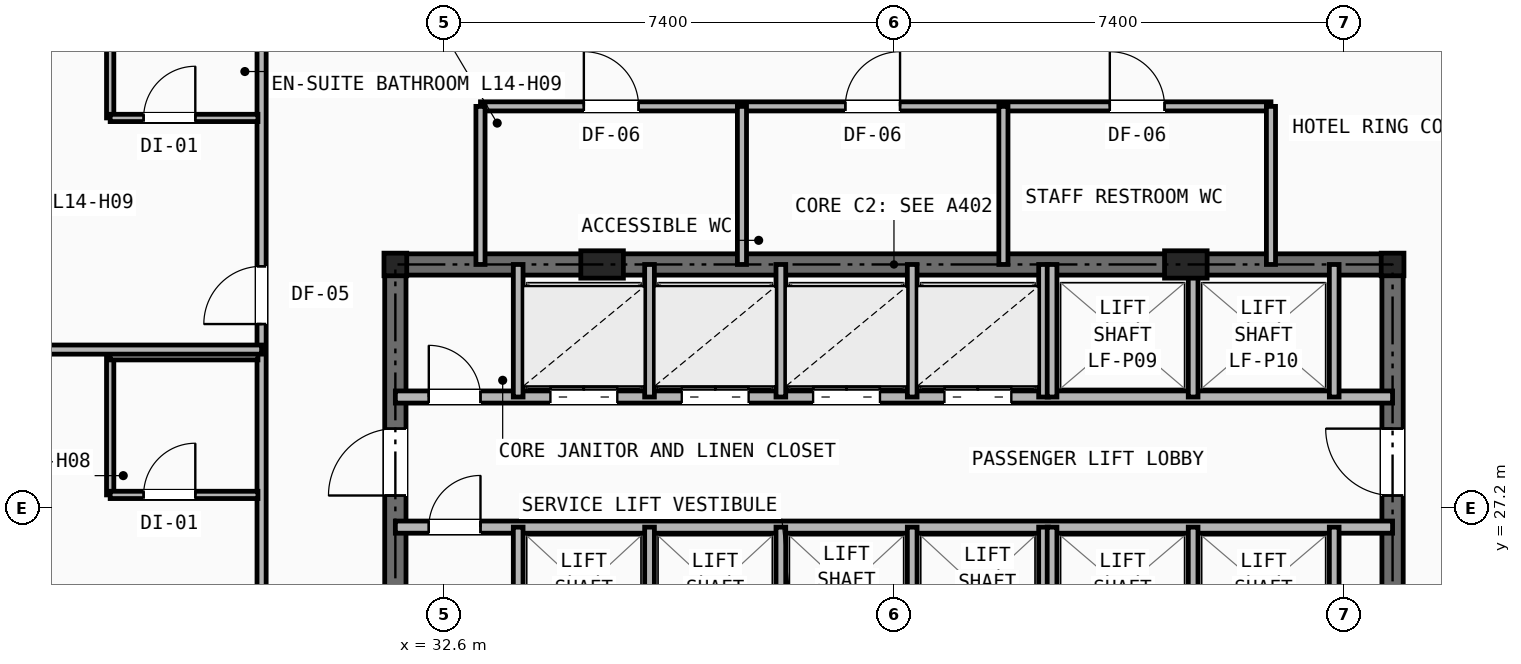
"""IFC4 building model, lengths in metres.
Left out: names, types, materials, properties, quantities, classifications, styles, units other than length and angle.
Written with IfcOpenShell. Run it as: python <this file> out.ifc"""

import sys

from ifc_helpers import new_model, si_unit, direction, frame, frame_2d, origin, origin_2d, place, context, subcontext, project, spatial, rectangle, i_section, extrude, element, fill, save


model = new_model("IFC4")
c1 = context("Model", 3, precision=1e-05, world=origin(), true_north=direction((0.0, 1.0)))
c2 = subcontext(c1, "Body", "Model", "MODEL_VIEW")
j1 = project(units=[si_unit("LENGTHUNIT", "METRE"), si_unit("PLANEANGLEUNIT", "RADIAN")], contexts=[c1])
p1 = place(None, origin())
s1 = spatial("IfcSite", under=j1, at=p1, CompositionType="ELEMENT")
p2 = place(p1, origin())
s2 = spatial("IfcBuilding", under=s1, at=p2, CompositionType="ELEMENT")
p3 = place(p2, frame((0.0, 0.0, 52.8)))
s3 = spatial("IfcBuildingStorey", under=s2, at=p3, CompositionType="ELEMENT", Elevation=52.8)
for number, where, z_axis, x_axis in (
    (1, (31.8, 31.2, 0.0), (0.0, 0.0, 1.0), (1.0, 0.0, 0.0)),
    (2, (48.2, 31.2, 0.0), (0.0, 0.0, 1.0), (1.0, 0.0, 0.0)),
):
    element("IfcColumn", number, at=place(p3, frame(where, z_axis=z_axis, x_axis=x_axis)), inside=s3, PredefinedType="COLUMN", context=c2, shape_type="SweptSolid", body=[
        extrude(i_section(OverallWidth=0.374, OverallDepth=0.372, WebThickness=0.016, FlangeThickness=0.026, at=origin_2d()), origin(), (0.0, 0.0, 1.0), 3.2),
    ])
for number, where, z_axis, x_axis in (
    (3, (35.2, 31.2, 0.0), (0.0, 0.0, 1.0), (1.0, 0.0, 0.0)),
    (4, (44.8, 31.2, 0.0), (0.0, 0.0, 1.0), (1.0, 0.0, 0.0)),
):
    element("IfcColumn", number, at=place(p3, frame(where, z_axis=z_axis, x_axis=x_axis)), inside=s3, PredefinedType="PILASTER", context=c2, shape_type="SweptSolid", body=[
        extrude(rectangle(XDim=0.7, YDim=0.45, at=origin_2d()), origin(), (0.0, 0.0, 1.0), 3.2),
    ])
p4 = place(p3, frame((31.8, 31.2, 0.0), z_axis=(0.0, 0.0, 1.0), x_axis=(1.0, 0.0, 0.0)))
e5 = element("IfcWall", 5, at=p4, inside=s3, PredefinedType="SHEAR", context=c2, shape_type="SweptSolid", body=[
    extrude(rectangle(XDim=16.4, YDim=0.35, at=frame_2d((8.2, 0.0))), origin(), (0.0, 0.0, 1.0), 2.98),
])
p5 = place(p3, frame((31.8, 16.4, 0.0), z_axis=(0.0, 0.0, 1.0), x_axis=(0.0, 1.0, 0.0)))
e6 = element("IfcWall", 6, at=p5, inside=s3, PredefinedType="SHEAR", context=c2, shape_type="SweptSolid", body=[
    extrude(rectangle(XDim=14.8, YDim=0.35, at=frame_2d((7.4, 0.0))), origin(), (0.0, 0.0, 1.0), 2.98),
])
p6 = place(p5, frame((11.0, 0.0, 0.0)))
e7 = element("IfcOpeningElement", 7, at=p6, cuts=e6, PredefinedType="OPENING", context=c2, shape_type="SweptSolid", body=[
    extrude(rectangle(XDim=1.1, YDim=2.15, at=frame_2d((0.55, 1.075))), frame((0.0, 0.185, 0.0), z_axis=(0.0, -1.0, 0.0), x_axis=(1.0, 0.0, 0.0)), (0.0, 0.0, 1.0), 0.37),
])
p7 = place(p3, frame((48.2, 16.4, 0.0), z_axis=(0.0, 0.0, 1.0), x_axis=(0.0, 1.0, 0.0)))
e8 = element("IfcWall", 8, at=p7, inside=s3, PredefinedType="SHEAR", context=c2, shape_type="SweptSolid", body=[
    extrude(rectangle(XDim=14.8, YDim=0.35, at=frame_2d((7.4, 0.0))), origin(), (0.0, 0.0, 1.0), 2.98),
])
p8 = place(p7, frame((11.0, 0.0, 0.0)))
e9 = element("IfcOpeningElement", 9, at=p8, cuts=e8, PredefinedType="OPENING", context=c2, shape_type="SweptSolid", body=[
    extrude(rectangle(XDim=1.1, YDim=2.15, at=frame_2d((0.55, 1.075))), frame((0.0, 0.185, 0.0), z_axis=(0.0, -1.0, 0.0), x_axis=(1.0, 0.0, 0.0)), (0.0, 0.0, 1.0), 0.37),
])
p9 = place(p3, frame((31.8, 29.02, 0.0), z_axis=(0.0, 0.0, 1.0), x_axis=(1.0, 0.0, 0.0)))
e10 = element("IfcWall", 10, at=p9, inside=s3, PredefinedType="SOLIDWALL", context=c2, shape_type="SweptSolid", body=[
    extrude(rectangle(XDim=16.4, YDim=0.2, at=frame_2d((8.2, 0.0))), origin(), (0.0, 0.0, 1.0), 2.431),
])
p10 = place(p9, frame((0.55, 0.0, 0.0)))
e11 = element("IfcOpeningElement", 11, at=p10, cuts=e10, PredefinedType="OPENING", context=c2, shape_type="SweptSolid", body=[
    extrude(rectangle(XDim=0.85, YDim=2.05, at=frame_2d((0.425, 1.025))), frame((0.0, 0.11, 0.0), z_axis=(0.0, -1.0, 0.0), x_axis=(1.0, 0.0, 0.0)), (0.0, 0.0, 1.0), 0.22),
])
p11 = place(p9, frame((2.55, 0.0, 0.0)))
e12 = element("IfcOpeningElement", 12, at=p11, cuts=e10, PredefinedType="OPENING", context=c2, shape_type="SweptSolid", body=[
    extrude(rectangle(XDim=1.1, YDim=2.15, at=frame_2d((0.55, 1.075))), frame((0.0, 0.11, 0.0), z_axis=(0.0, -1.0, 0.0), x_axis=(1.0, 0.0, 0.0)), (0.0, 0.0, 1.0), 0.22),
])
p12 = place(p9, frame((4.71, 0.0, 0.0)))
e13 = element("IfcOpeningElement", 13, at=p12, cuts=e10, PredefinedType="OPENING", context=c2, shape_type="SweptSolid", body=[
    extrude(rectangle(XDim=1.1, YDim=2.15, at=frame_2d((0.55, 1.075))), frame((0.0, 0.11, 0.0), z_axis=(0.0, -1.0, 0.0), x_axis=(1.0, 0.0, 0.0)), (0.0, 0.0, 1.0), 0.22),
])
p13 = place(p9, frame((6.87, 0.0, 0.0)))
e14 = element("IfcOpeningElement", 14, at=p13, cuts=e10, PredefinedType="OPENING", context=c2, shape_type="SweptSolid", body=[
    extrude(rectangle(XDim=1.1, YDim=2.15, at=frame_2d((0.55, 1.075))), frame((0.0, 0.11, 0.0), z_axis=(0.0, -1.0, 0.0), x_axis=(1.0, 0.0, 0.0)), (0.0, 0.0, 1.0), 0.22),
])
p14 = place(p9, frame((9.03, 0.0, 0.0)))
e15 = element("IfcOpeningElement", 15, at=p14, cuts=e10, PredefinedType="OPENING", context=c2, shape_type="SweptSolid", body=[
    extrude(rectangle(XDim=1.1, YDim=2.15, at=frame_2d((0.55, 1.075))), frame((0.0, 0.11, 0.0), z_axis=(0.0, -1.0, 0.0), x_axis=(1.0, 0.0, 0.0)), (0.0, 0.0, 1.0), 0.22),
])
p15 = place(p3, frame((31.8, 26.88, 0.0), z_axis=(0.0, 0.0, 1.0), x_axis=(1.0, 0.0, 0.0)))
e16 = element("IfcWall", 16, at=p15, inside=s3, PredefinedType="SOLIDWALL", context=c2, shape_type="SweptSolid", body=[
    extrude(rectangle(XDim=16.4, YDim=0.2, at=frame_2d((8.2, 0.0))), origin(), (0.0, 0.0, 1.0), 2.431),
])
p16 = place(p15, frame((0.55, 0.0, 0.0)))
e17 = element("IfcOpeningElement", 17, at=p16, cuts=e16, PredefinedType="OPENING", context=c2, shape_type="SweptSolid", body=[
    extrude(rectangle(XDim=0.85, YDim=2.05, at=frame_2d((0.425, 1.025))), frame((0.0, 0.11, 0.0), z_axis=(0.0, -1.0, 0.0), x_axis=(1.0, 0.0, 0.0)), (0.0, 0.0, 1.0), 0.22),
])
p17 = place(p3, frame((33.82, 29.02, 0.0), z_axis=(0.0, 0.0, 1.0), x_axis=(0.0, 1.0, 0.0)))
e18 = element("IfcWall", 18, at=p17, inside=s3, PredefinedType="SOLIDWALL", context=c2, shape_type="SweptSolid", body=[
    extrude(rectangle(XDim=2.18, YDim=0.16, at=frame_2d((1.09, 0.0))), origin(), (0.0, 0.0, 1.0), 2.431),
])
p18 = place(p3, frame((33.82, 24.8, 0.0), z_axis=(0.0, 0.0, 1.0), x_axis=(0.0, 1.0, 0.0)))
e19 = element("IfcWall", 19, at=p18, inside=s3, PredefinedType="SOLIDWALL", context=c2, shape_type="SweptSolid", body=[
    extrude(rectangle(XDim=2.08, YDim=0.16, at=frame_2d((1.04, 0.0))), origin(), (0.0, 0.0, 1.0), 2.98),
])
for number, where, z_axis, x_axis in (
    (20, (35.98, 29.02, 0.0), (0.0, 0.0, 1.0), (0.0, 1.0, 0.0)),
    (21, (38.14, 29.02, 0.0), (0.0, 0.0, 1.0), (0.0, 1.0, 0.0)),
    (22, (40.3, 29.02, 0.0), (0.0, 0.0, 1.0), (0.0, 1.0, 0.0)),
    (23, (42.46, 29.02, 0.0), (0.0, 0.0, 1.0), (0.0, 1.0, 0.0)),
):
    element("IfcWall", number, at=place(p3, frame(where, z_axis=z_axis, x_axis=x_axis)), inside=s3, PredefinedType="SOLIDWALL", context=c2, shape_type="SweptSolid", body=[
        extrude(rectangle(XDim=2.18, YDim=0.16, at=frame_2d((1.09, 0.0))), origin(), (0.0, 0.0, 1.0), 2.431),
    ])
for number, where, z_axis, x_axis in (
    (24, (35.98, 24.8, 0.0), (0.0, 0.0, 1.0), (0.0, 1.0, 0.0)),
    (25, (38.14, 24.8, 0.0), (0.0, 0.0, 1.0), (0.0, 1.0, 0.0)),
    (26, (40.3, 24.8, 0.0), (0.0, 0.0, 1.0), (0.0, 1.0, 0.0)),
    (27, (42.46, 24.8, 0.0), (0.0, 0.0, 1.0), (0.0, 1.0, 0.0)),
):
    element("IfcWall", number, at=place(p3, frame(where, z_axis=z_axis, x_axis=x_axis)), inside=s3, PredefinedType="SOLIDWALL", context=c2, shape_type="SweptSolid", body=[
        extrude(rectangle(XDim=2.08, YDim=0.16, at=frame_2d((1.04, 0.0))), origin(), (0.0, 0.0, 1.0), 2.98),
    ])
for number, where, z_axis, x_axis in (
    (28, (42.6, 29.02, 0.0), (0.0, 0.0, 1.0), (0.0, 1.0, 0.0)),
    (29, (44.92, 29.02, 0.0), (0.0, 0.0, 1.0), (0.0, 1.0, 0.0)),
    (30, (47.24, 29.02, 0.0), (0.0, 0.0, 1.0), (0.0, 1.0, 0.0)),
):
    element("IfcWall", number, at=place(p3, frame(where, z_axis=z_axis, x_axis=x_axis)), inside=s3, PredefinedType="SOLIDWALL", context=c2, shape_type="SweptSolid", body=[
        extrude(rectangle(XDim=2.18, YDim=0.16, at=frame_2d((1.09, 0.0))), origin(), (0.0, 0.0, 1.0), 2.431),
    ])
for number, where, z_axis, x_axis in (
    (31, (42.6, 24.8, 0.0), (0.0, 0.0, 1.0), (0.0, 1.0, 0.0)),
    (32, (44.92, 24.8, 0.0), (0.0, 0.0, 1.0), (0.0, 1.0, 0.0)),
    (33, (47.24, 24.8, 0.0), (0.0, 0.0, 1.0), (0.0, 1.0, 0.0)),
):
    element("IfcWall", number, at=place(p3, frame(where, z_axis=z_axis, x_axis=x_axis)), inside=s3, PredefinedType="SOLIDWALL", context=c2, shape_type="SweptSolid", body=[
        extrude(rectangle(XDim=2.08, YDim=0.16, at=frame_2d((1.04, 0.0))), origin(), (0.0, 0.0, 1.0), 2.98),
    ])
p19 = place(p3, frame((33.2, 33.8, 0.0), z_axis=(0.0, 0.0, 1.0), x_axis=(1.0, 0.0, 0.0)))
e34 = element("IfcWall", 34, at=p19, inside=s3, PredefinedType="PARTITIONING", context=c2, shape_type="SweptSolid", body=[
    extrude(rectangle(XDim=13.0, YDim=0.15, at=frame_2d((6.5, 0.0))), origin(), (0.0, 0.0, 1.0), 2.98),
])
p20 = place(p19, frame((1.7, 0.0, 0.0)))
e35 = element("IfcOpeningElement", 35, at=p20, cuts=e34, PredefinedType="OPENING", context=c2, shape_type="SweptSolid", body=[
    extrude(rectangle(XDim=0.9, YDim=2.1, at=frame_2d((0.45, 1.05))), frame((0.0, 0.085, 0.0), z_axis=(0.0, -1.0, 0.0), x_axis=(1.0, 0.0, 0.0)), (0.0, 0.0, 1.0), 0.17),
])
p21 = place(p19, frame((6.0, 0.0, 0.0)))
e36 = element("IfcOpeningElement", 36, at=p21, cuts=e34, PredefinedType="OPENING", context=c2, shape_type="SweptSolid", body=[
    extrude(rectangle(XDim=0.9, YDim=2.1, at=frame_2d((0.45, 1.05))), frame((0.0, 0.085, 0.0), z_axis=(0.0, -1.0, 0.0), x_axis=(1.0, 0.0, 0.0)), (0.0, 0.0, 1.0), 0.17),
])
p22 = place(p19, frame((10.35, 0.0, 0.0)))
e37 = element("IfcOpeningElement", 37, at=p22, cuts=e34, PredefinedType="OPENING", context=c2, shape_type="SweptSolid", body=[
    extrude(rectangle(XDim=0.9, YDim=2.1, at=frame_2d((0.45, 1.05))), frame((0.0, 0.085, 0.0), z_axis=(0.0, -1.0, 0.0), x_axis=(1.0, 0.0, 0.0)), (0.0, 0.0, 1.0), 0.17),
])
for number, where, z_axis, x_axis in (
    (38, (33.2, 31.2, 0.0), (0.0, 0.0, 1.0), (0.0, 1.0, 0.0)),
    (39, (46.2, 31.2, 0.0), (0.0, 0.0, 1.0), (0.0, 1.0, 0.0)),
    (40, (37.5, 31.2, 0.0), (0.0, 0.0, 1.0), (0.0, 1.0, 0.0)),
    (41, (41.8, 31.2, 0.0), (0.0, 0.0, 1.0), (0.0, 1.0, 0.0)),
):
    element("IfcWall", number, at=place(p3, frame(where, z_axis=z_axis, x_axis=x_axis)), inside=s3, PredefinedType="PARTITIONING", context=c2, shape_type="SweptSolid", body=[
        extrude(rectangle(XDim=2.6, YDim=0.15, at=frame_2d((1.3, 0.0))), origin(), (0.0, 0.0, 1.0), 2.431),
    ])
p23 = place(p3, frame((29.6, 14.1, 0.0), z_axis=(0.0, 0.0, 1.0), x_axis=(0.0, 1.0, 0.0)))
e42 = element("IfcWall", 42, at=p23, inside=s3, PredefinedType="PARTITIONING", context=c2, shape_type="SweptSolid", body=[
    extrude(rectangle(XDim=21.9, YDim=0.15, at=frame_2d((10.95, 0.0))), origin(), (0.0, 0.0, 1.0), 2.191),
])
p24 = place(p23, frame((0.42, 0.0, 0.0)))
e43 = element("IfcOpeningElement", 43, at=p24, cuts=e42, PredefinedType="OPENING", context=c2, shape_type="SweptSolid", body=[
    extrude(rectangle(XDim=0.95, YDim=2.1, at=frame_2d((0.475, 1.05))), frame((0.0, 0.085, 0.0), z_axis=(0.0, -1.0, 0.0), x_axis=(1.0, 0.0, 0.0)), (0.0, 0.0, 1.0), 0.17),
])
p25 = place(p23, frame((5.12, 0.0, 0.0)))
e44 = element("IfcOpeningElement", 44, at=p25, cuts=e42, PredefinedType="OPENING", context=c2, shape_type="SweptSolid", body=[
    extrude(rectangle(XDim=0.95, YDim=2.1, at=frame_2d((0.475, 1.05))), frame((0.0, 0.085, 0.0), z_axis=(0.0, -1.0, 0.0), x_axis=(1.0, 0.0, 0.0)), (0.0, 0.0, 1.0), 0.17),
])
p26 = place(p23, frame((10.12, 0.0, 0.0)))
e45 = element("IfcOpeningElement", 45, at=p26, cuts=e42, PredefinedType="OPENING", context=c2, shape_type="SweptSolid", body=[
    extrude(rectangle(XDim=0.95, YDim=2.1, at=frame_2d((0.475, 1.05))), frame((0.0, 0.085, 0.0), z_axis=(0.0, -1.0, 0.0), x_axis=(1.0, 0.0, 0.0)), (0.0, 0.0, 1.0), 0.17),
])
p27 = place(p23, frame((16.12, 0.0, 0.0)))
e46 = element("IfcOpeningElement", 46, at=p27, cuts=e42, PredefinedType="OPENING", context=c2, shape_type="SweptSolid", body=[
    extrude(rectangle(XDim=0.95, YDim=2.1, at=frame_2d((0.475, 1.05))), frame((0.0, 0.085, 0.0), z_axis=(0.0, -1.0, 0.0), x_axis=(1.0, 0.0, 0.0)), (0.0, 0.0, 1.0), 0.17),
])
p28 = place(p3, frame((27.11, 27.41, 0.0), z_axis=(0.0, 0.0, 1.0), x_axis=(0.0, 1.0, 0.0)))
e47 = element("IfcWall", 47, at=p28, inside=s3, PredefinedType="PARTITIONING", context=c2, shape_type="SweptSolid", body=[
    extrude(rectangle(XDim=2.28, YDim=0.12, at=frame_2d((1.14, 0.0))), origin(), (0.0, 0.0, 1.0), 2.98),
])
p29 = place(p3, frame((27.11, 27.41, 0.0), z_axis=(0.0, 0.0, 1.0), x_axis=(1.0, 0.0, 0.0)))
e48 = element("IfcWall", 48, at=p29, inside=s3, PredefinedType="PARTITIONING", context=c2, shape_type="SweptSolid", body=[
    extrude(rectangle(XDim=2.43, YDim=0.12, at=frame_2d((1.215, 0.0))), origin(), (0.0, 0.0, 1.0), 2.98),
])
p30 = place(p29, frame((0.55, 0.0, 0.0)))
e49 = element("IfcOpeningElement", 49, at=p30, cuts=e48, PredefinedType="OPENING", context=c2, shape_type="SweptSolid", body=[
    extrude(rectangle(XDim=0.85, YDim=2.05, at=frame_2d((0.425, 1.025))), frame((0.0, 0.07, 0.0), z_axis=(0.0, -1.0, 0.0), x_axis=(1.0, 0.0, 0.0)), (0.0, 0.0, 1.0), 0.14),
])
p31 = place(p3, frame((27.11, 29.69, 0.0), z_axis=(0.0, 0.0, 1.0), x_axis=(1.0, 0.0, 0.0)))
e50 = element("IfcWall", 50, at=p31, inside=s3, PredefinedType="PARTITIONING", context=c2, shape_type="SweptSolid", body=[
    extrude(rectangle(XDim=2.43, YDim=0.12, at=frame_2d((1.215, 0.0))), origin(), (0.0, 0.0, 1.0), 2.98),
])
p32 = place(p3, frame((19.333, 29.8, 0.0), z_axis=(0.0, 0.0, 1.0), x_axis=(1.0, 0.0, 0.0)))
e51 = element("IfcWall", 51, at=p32, inside=s3, PredefinedType="PARTITIONING", context=c2, shape_type="SweptSolid", body=[
    extrude(rectangle(XDim=10.267, YDim=0.15, at=frame_2d((5.133, 0.0))), origin(), (0.0, 0.0, 1.0), 2.268),
])
p33 = place(p3, frame((27.11, 33.61, 0.0), z_axis=(0.0, 0.0, 1.0), x_axis=(0.0, 1.0, 0.0)))
e52 = element("IfcWall", 52, at=p33, inside=s3, PredefinedType="PARTITIONING", context=c2, shape_type="SweptSolid", body=[
    extrude(rectangle(XDim=2.28, YDim=0.12, at=frame_2d((1.14, 0.0))), origin(), (0.0, 0.0, 1.0), 2.513),
])
p34 = place(p3, frame((27.11, 33.61, 0.0), z_axis=(0.0, 0.0, 1.0), x_axis=(1.0, 0.0, 0.0)))
e53 = element("IfcWall", 53, at=p34, inside=s3, PredefinedType="PARTITIONING", context=c2, shape_type="SweptSolid", body=[
    extrude(rectangle(XDim=2.43, YDim=0.12, at=frame_2d((1.215, 0.0))), origin(), (0.0, 0.0, 1.0), 2.513),
])
p35 = place(p34, frame((0.55, 0.0, 0.0)))
e54 = element("IfcOpeningElement", 54, at=p35, cuts=e53, PredefinedType="OPENING", context=c2, shape_type="SweptSolid", body=[
    extrude(rectangle(XDim=0.85, YDim=2.05, at=frame_2d((0.425, 1.025))), frame((0.0, 0.07, 0.0), z_axis=(0.0, -1.0, 0.0), x_axis=(1.0, 0.0, 0.0)), (0.0, 0.0, 1.0), 0.14),
])
p36 = place(p10, origin())
e55 = element("IfcDoor", 55, at=p36, inside=s3, OperationType="SINGLE_SWING_LEFT", PredefinedType="DOOR", context=c2, shape_type="SweptSolid", body=[
    extrude(rectangle(XDim=0.85, YDim=2.05, at=frame_2d((0.425, 1.025))), frame((0.0, 0.025, 0.0), z_axis=(0.0, -1.0, 0.0), x_axis=(1.0, 0.0, 0.0)), (0.0, 0.0, 1.0), 0.05),
])
fill(e11, e55)
p37 = place(p16, origin())
e56 = element("IfcDoor", 56, at=p37, inside=s3, OperationType="SINGLE_SWING_RIGHT", PredefinedType="DOOR", context=c2, shape_type="SweptSolid", body=[
    extrude(rectangle(XDim=0.85, YDim=2.05, at=frame_2d((0.425, 1.025))), frame((0.0, 0.025, 0.0), z_axis=(0.0, -1.0, 0.0), x_axis=(1.0, 0.0, 0.0)), (0.0, 0.0, 1.0), 0.05),
])
fill(e17, e56)
p38 = place(p6, origin())
e57 = element("IfcDoor", 57, at=p38, inside=s3, OperationType="SINGLE_SWING_LEFT", PredefinedType="DOOR", context=c2, shape_type="SweptSolid", body=[
    extrude(rectangle(XDim=1.1, YDim=2.15, at=frame_2d((0.55, 1.075))), frame((0.0, 0.025, 0.0), z_axis=(0.0, -1.0, 0.0), x_axis=(1.0, 0.0, 0.0)), (0.0, 0.0, 1.0), 0.05),
])
fill(e7, e57)
p39 = place(p8, origin())
e58 = element("IfcDoor", 58, at=p39, inside=s3, OperationType="SINGLE_SWING_RIGHT", PredefinedType="DOOR", context=c2, shape_type="SweptSolid", body=[
    extrude(rectangle(XDim=1.1, YDim=2.15, at=frame_2d((0.55, 1.075))), frame((0.0, 0.025, 0.0), z_axis=(0.0, -1.0, 0.0), x_axis=(1.0, 0.0, 0.0)), (0.0, 0.0, 1.0), 0.05),
])
fill(e9, e58)
p40 = place(p11, origin())
e59 = element("IfcDoor", 59, at=p40, inside=s3, OperationType="DOUBLE_DOOR_SLIDING", PredefinedType="DOOR", context=c2, shape_type="SweptSolid", body=[
    extrude(rectangle(XDim=1.1, YDim=2.15, at=frame_2d((0.55, 1.075))), frame((0.0, 0.025, 0.0), z_axis=(0.0, -1.0, 0.0), x_axis=(1.0, 0.0, 0.0)), (0.0, 0.0, 1.0), 0.05),
])
fill(e12, e59)
p41 = place(p12, origin())
e60 = element("IfcDoor", 60, at=p41, inside=s3, OperationType="DOUBLE_DOOR_SLIDING", PredefinedType="DOOR", context=c2, shape_type="SweptSolid", body=[
    extrude(rectangle(XDim=1.1, YDim=2.15, at=frame_2d((0.55, 1.075))), frame((0.0, 0.025, 0.0), z_axis=(0.0, -1.0, 0.0), x_axis=(1.0, 0.0, 0.0)), (0.0, 0.0, 1.0), 0.05),
])
fill(e13, e60)
p42 = place(p13, origin())
e61 = element("IfcDoor", 61, at=p42, inside=s3, OperationType="DOUBLE_DOOR_SLIDING", PredefinedType="DOOR", context=c2, shape_type="SweptSolid", body=[
    extrude(rectangle(XDim=1.1, YDim=2.15, at=frame_2d((0.55, 1.075))), frame((0.0, 0.025, 0.0), z_axis=(0.0, -1.0, 0.0), x_axis=(1.0, 0.0, 0.0)), (0.0, 0.0, 1.0), 0.05),
])
fill(e14, e61)
p43 = place(p14, origin())
e62 = element("IfcDoor", 62, at=p43, inside=s3, OperationType="DOUBLE_DOOR_SLIDING", PredefinedType="DOOR", context=c2, shape_type="SweptSolid", body=[
    extrude(rectangle(XDim=1.1, YDim=2.15, at=frame_2d((0.55, 1.075))), frame((0.0, 0.025, 0.0), z_axis=(0.0, -1.0, 0.0), x_axis=(1.0, 0.0, 0.0)), (0.0, 0.0, 1.0), 0.05),
])
fill(e15, e62)
p44 = place(p20, origin())
e63 = element("IfcDoor", 63, at=p44, inside=s3, OperationType="SINGLE_SWING_LEFT", PredefinedType="DOOR", context=c2, shape_type="SweptSolid", body=[
    extrude(rectangle(XDim=0.9, YDim=2.1, at=frame_2d((0.45, 1.05))), frame((0.0, 0.025, 0.0), z_axis=(0.0, -1.0, 0.0), x_axis=(1.0, 0.0, 0.0)), (0.0, 0.0, 1.0), 0.05),
])
fill(e35, e63)
p45 = place(p21, origin())
e64 = element("IfcDoor", 64, at=p45, inside=s3, OperationType="SINGLE_SWING_RIGHT", PredefinedType="DOOR", context=c2, shape_type="SweptSolid", body=[
    extrude(rectangle(XDim=0.9, YDim=2.1, at=frame_2d((0.45, 1.05))), frame((0.0, 0.025, 0.0), z_axis=(0.0, -1.0, 0.0), x_axis=(1.0, 0.0, 0.0)), (0.0, 0.0, 1.0), 0.05),
])
fill(e36, e64)
p46 = place(p22, origin())
e65 = element("IfcDoor", 65, at=p46, inside=s3, OperationType="SINGLE_SWING_LEFT", PredefinedType="DOOR", context=c2, shape_type="SweptSolid", body=[
    extrude(rectangle(XDim=0.9, YDim=2.1, at=frame_2d((0.45, 1.05))), frame((0.0, 0.025, 0.0), z_axis=(0.0, -1.0, 0.0), x_axis=(1.0, 0.0, 0.0)), (0.0, 0.0, 1.0), 0.05),
])
fill(e37, e65)
p47 = place(p30, origin())
e66 = element("IfcDoor", 66, at=p47, inside=s3, OperationType="SINGLE_SWING_RIGHT", PredefinedType="DOOR", context=c2, shape_type="SweptSolid", body=[
    extrude(rectangle(XDim=0.85, YDim=2.05, at=frame_2d((0.425, 1.025))), frame((0.0, 0.025, 0.0), z_axis=(0.0, -1.0, 0.0), x_axis=(1.0, 0.0, 0.0)), (0.0, 0.0, 1.0), 0.05),
])
fill(e49, e66)
p48 = place(p27, origin())
e67 = element("IfcDoor", 67, at=p48, inside=s3, OperationType="SINGLE_SWING_LEFT", PredefinedType="DOOR", context=c2, shape_type="SweptSolid", body=[
    extrude(rectangle(XDim=0.95, YDim=2.1, at=frame_2d((0.475, 1.05))), frame((0.0, 0.025, 0.0), z_axis=(0.0, -1.0, 0.0), x_axis=(1.0, 0.0, 0.0)), (0.0, 0.0, 1.0), 0.05),
])
fill(e46, e67)
p49 = place(p35, origin())
e68 = element("IfcDoor", 68, at=p49, inside=s3, OperationType="SINGLE_SWING_RIGHT", PredefinedType="DOOR", context=c2, shape_type="SweptSolid", body=[
    extrude(rectangle(XDim=0.85, YDim=2.05, at=frame_2d((0.425, 1.025))), frame((0.0, 0.025, 0.0), z_axis=(0.0, -1.0, 0.0), x_axis=(1.0, 0.0, 0.0)), (0.0, 0.0, 1.0), 0.05),
])
fill(e54, e68)
save(model, sys.argv[1])
